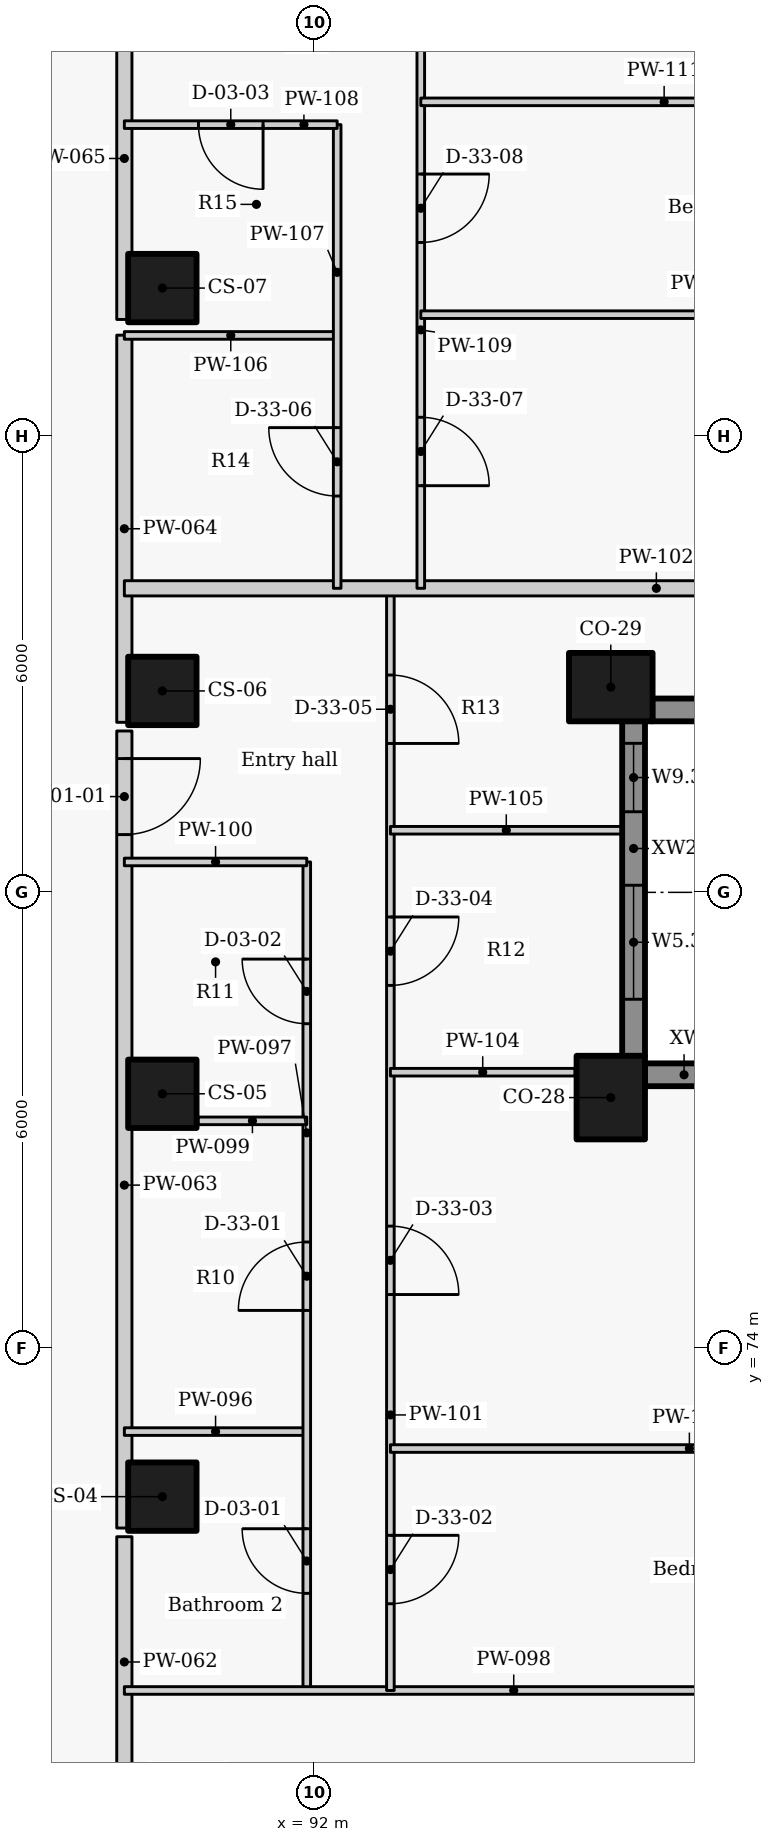
"""IFC4 building model, lengths in metres.
Left out: names, types, materials, properties, quantities, classifications, styles, units other than length and angle.
Written with IfcOpenShell. Run it as: python <this file> out.ifc"""

import sys

from ifc_helpers import new_model, si_unit, direction, frame, frame_2d, origin, origin_2d, place, context, subcontext, project, spatial, rectangle, extrude, element, fill, save


model = new_model("IFC4")
c1 = context("Model", 3, precision=1e-05, world=origin(), true_north=direction((0.0, 1.0)))
c2 = subcontext(c1, "Body", "Model", "MODEL_VIEW")
j1 = project(units=[si_unit("LENGTHUNIT", "METRE"), si_unit("PLANEANGLEUNIT", "RADIAN")], contexts=[c1])
p1 = place(None, origin())
s1 = spatial("IfcSite", under=j1, at=p1, CompositionType="ELEMENT")
p2 = place(p1, origin())
s2 = spatial("IfcBuilding", under=s1, at=p2, CompositionType="ELEMENT")
p3 = place(p2, frame((0.0, 0.0, 249.3)))
s3 = spatial("IfcBuildingStorey", under=s2, at=p3, CompositionType="ELEMENT", Elevation=249.3)
for number, where, z_axis, x_axis in (
    (1, (95.899, 77.3, 0.0), (0.0, 0.0, 1.0), (0.0, 1.0, 0.0)),
    (2, (95.899, 82.7, 0.0), (0.0, 0.0, 1.0), (1.0, 0.0, 0.0)),
):
    element("IfcColumn", number, at=place(p3, frame(where, z_axis=z_axis, x_axis=x_axis)), inside=s3, PredefinedType="COLUMN", context=c2, shape_type="SweptSolid", body=[
        extrude(rectangle(XDim=1.1, YDim=0.9, at=origin_2d()), origin(), (0.0, 0.0, 1.0), 3.3),
    ])
for number, where, z_axis, x_axis in (
    (3, (90.0, 72.05, 0.0), (0.0, 0.0, 1.0), (0.0, 1.0, 0.0)),
    (4, (90.0, 77.35, 0.0), (0.0, 0.0, 1.0), (0.0, 1.0, 0.0)),
    (5, (90.0, 82.65, 0.0), (0.0, 0.0, 1.0), (0.0, 1.0, 0.0)),
    (6, (90.0, 87.95, 0.0), (0.0, 0.0, 1.0), (0.0, 1.0, 0.0)),
):
    element("IfcColumn", number, at=place(p3, frame(where, z_axis=z_axis, x_axis=x_axis)), inside=s3, PredefinedType="COLUMN", context=c2, shape_type="SweptSolid", body=[
        extrude(rectangle(XDim=0.9, YDim=0.9, at=origin_2d()), origin(), (0.0, 0.0, 1.0), 3.3),
    ])
p4 = place(p3, frame((96.446, 82.4, 0.0), z_axis=(0.0, 0.0, 1.0), x_axis=(1.0, 0.0, 0.0)))
e7 = element("IfcWall", 7, at=p4, inside=s3, PredefinedType="SOLIDWALL", context=c2, shape_type="SweptSolid", body=[
    extrude(rectangle(XDim=4.272, YDim=0.3, at=frame_2d((2.136, 0.0))), origin(), (0.0, 0.0, 1.0), 2.425),
])
p5 = place(p4, frame((1.386, 0.0, 0.9)))
e8 = element("IfcOpeningElement", 8, at=p5, cuts=e7, PredefinedType="OPENING", context=c2, shape_type="SweptSolid", body=[
    extrude(rectangle(XDim=1.5, YDim=1.1, at=frame_2d((0.75, 0.55))), frame((0.0, 0.16, 0.0), z_axis=(0.0, -1.0, 0.0), x_axis=(1.0, 0.0, 0.0)), (0.0, 0.0, 1.0), 0.32),
])
p6 = place(p3, frame((100.718, 77.6, 0.0), z_axis=(0.0, 0.0, 1.0), x_axis=(-1.0, 0.0, 0.0)))
e9 = element("IfcWall", 9, at=p6, inside=s3, PredefinedType="SOLIDWALL", context=c2, shape_type="SweptSolid", body=[
    extrude(rectangle(XDim=4.373, YDim=0.3, at=frame_2d((2.186, 0.0))), origin(), (0.0, 0.0, 1.0), 2.425),
])
p7 = place(p6, frame((1.136, 0.0, 0.9)))
e10 = element("IfcOpeningElement", 10, at=p7, cuts=e9, PredefinedType="OPENING", context=c2, shape_type="SweptSolid", body=[
    extrude(rectangle(XDim=2.1, YDim=1.1, at=frame_2d((1.05, 0.55))), frame((0.0, 0.16, 0.0), z_axis=(0.0, -1.0, 0.0), x_axis=(1.0, 0.0, 0.0)), (0.0, 0.0, 1.0), 0.32),
])
p8 = place(p3, frame((96.199, 77.846, 0.0), z_axis=(0.0, 0.0, 1.0), x_axis=(0.0, 1.0, 0.0)))
e11 = element("IfcWall", 11, at=p8, inside=s3, PredefinedType="SOLIDWALL", context=c2, shape_type="SweptSolid", body=[
    extrude(rectangle(XDim=4.408, YDim=0.3, at=frame_2d((2.204, 0.0))), origin(), (0.0, 0.0, 1.0), 2.425),
])
p9 = place(p8, frame((0.748, 0.0, 0.9)))
e12 = element("IfcOpeningElement", 12, at=p9, cuts=e11, PredefinedType="OPENING", context=c2, shape_type="SweptSolid", body=[
    extrude(rectangle(XDim=1.5, YDim=1.1, at=frame_2d((0.75, 0.55))), frame((0.0, 0.16, 0.0), z_axis=(0.0, -1.0, 0.0), x_axis=(1.0, 0.0, 0.0)), (0.0, 0.0, 1.0), 0.32),
])
p10 = place(p8, frame((3.215, 0.0, 0.9)))
e13 = element("IfcOpeningElement", 13, at=p10, cuts=e11, PredefinedType="OPENING", context=c2, shape_type="SweptSolid", body=[
    extrude(rectangle(XDim=0.9, YDim=1.1, at=frame_2d((0.45, 0.55))), frame((0.0, 0.16, 0.0), z_axis=(0.0, -1.0, 0.0), x_axis=(1.0, 0.0, 0.0)), (0.0, 0.0, 1.0), 0.32),
])
p11 = place(p3, frame((89.5, 68.227, 0.0), z_axis=(0.0, 0.0, 1.0), x_axis=(0.0, 1.0, 0.0)))
e14 = element("IfcWall", 14, at=p11, inside=s3, PredefinedType="PARTITIONING", context=c2, shape_type="SweptSolid", body=[
    extrude(rectangle(XDim=3.296, YDim=0.2, at=frame_2d((1.648, 0.0))), origin(), (0.0, 0.0, 1.0), 3.025),
])
p12 = place(p3, frame((89.5, 82.123, 0.0), z_axis=(0.0, 0.0, 1.0), x_axis=(0.0, -1.0, 0.0)))
e15 = element("IfcWall", 15, at=p12, inside=s3, PredefinedType="PARTITIONING", context=c2, shape_type="SweptSolid", body=[
    extrude(rectangle(XDim=10.486, YDim=0.2, at=frame_2d((5.243, 0.0))), origin(), (0.0, 0.0, 1.0), 3.025),
])
p13 = place(p12, frame((0.363, 0.0, 0.0)))
e16 = element("IfcOpeningElement", 16, at=p13, cuts=e15, PredefinedType="OPENING", context=c2, shape_type="SweptSolid", body=[
    extrude(rectangle(XDim=1.0, YDim=2.1, at=frame_2d((0.5, 1.05))), frame((0.0, 0.11, 0.0), z_axis=(0.0, -1.0, 0.0), x_axis=(1.0, 0.0, 0.0)), (0.0, 0.0, 1.0), 0.22),
])
p14 = place(p3, frame((89.5, 82.237, 0.0), z_axis=(0.0, 0.0, 1.0), x_axis=(0.0, 1.0, 0.0)))
e17 = element("IfcWall", 17, at=p14, inside=s3, PredefinedType="PARTITIONING", context=c2, shape_type="SweptSolid", body=[
    extrude(rectangle(XDim=5.093, YDim=0.2, at=frame_2d((2.547, 0.0))), origin(), (0.0, 0.0, 1.0), 3.025),
])
p15 = place(p3, frame((89.5, 87.537, 0.0), z_axis=(0.0, 0.0, 1.0), x_axis=(0.0, 1.0, 0.0)))
e18 = element("IfcWall", 18, at=p15, inside=s3, PredefinedType="PARTITIONING", context=c2, shape_type="SweptSolid", body=[
    extrude(rectangle(XDim=4.236, YDim=0.2, at=frame_2d((2.118, 0.0))), origin(), (0.0, 0.0, 1.0), 3.025),
])
p16 = place(p3, frame((89.5, 72.906, 0.0), z_axis=(0.0, 0.0, 1.0), x_axis=(1.0, 0.0, 0.0)))
e19 = element("IfcWall", 19, at=p16, inside=s3, PredefinedType="PARTITIONING", context=c2, shape_type="SweptSolid", body=[
    extrude(rectangle(XDim=2.4, YDim=0.1, at=frame_2d((1.2, 0.0))), origin(), (0.0, 0.0, 1.0), 2.505),
])
p17 = place(p3, frame((91.9, 69.5, 0.0), z_axis=(0.0, 0.0, 1.0), x_axis=(0.0, 1.0, 0.0)))
e20 = element("IfcWall", 20, at=p17, inside=s3, PredefinedType="PARTITIONING", context=c2, shape_type="SweptSolid", body=[
    extrude(rectangle(XDim=10.9, YDim=0.1, at=frame_2d((5.45, 0.0))), origin(), (0.0, 0.0, 1.0), 3.025),
])
p18 = place(p17, frame((1.278, 0.0, 0.0)))
e21 = element("IfcOpeningElement", 21, at=p18, cuts=e20, PredefinedType="OPENING", context=c2, shape_type="SweptSolid", body=[
    extrude(rectangle(XDim=0.85, YDim=2.1, at=frame_2d((0.425, 1.05))), frame((0.0, 0.06, 0.0), z_axis=(0.0, -1.0, 0.0), x_axis=(1.0, 0.0, 0.0)), (0.0, 0.0, 1.0), 0.12),
])
p19 = place(p17, frame((5.0, 0.0, 0.0)))
e22 = element("IfcOpeningElement", 22, at=p19, cuts=e20, PredefinedType="OPENING", context=c2, shape_type="SweptSolid", body=[
    extrude(rectangle(XDim=0.9, YDim=2.1, at=frame_2d((0.45, 1.05))), frame((0.0, 0.06, 0.0), z_axis=(0.0, -1.0, 0.0), x_axis=(1.0, 0.0, 0.0)), (0.0, 0.0, 1.0), 0.12),
])
p20 = place(p17, frame((8.772, 0.0, 0.0)))
e23 = element("IfcOpeningElement", 23, at=p20, cuts=e20, PredefinedType="OPENING", context=c2, shape_type="SweptSolid", body=[
    extrude(rectangle(XDim=0.85, YDim=2.1, at=frame_2d((0.425, 1.05))), frame((0.0, 0.06, 0.0), z_axis=(0.0, -1.0, 0.0), x_axis=(1.0, 0.0, 0.0)), (0.0, 0.0, 1.0), 0.12),
])
p21 = place(p3, frame((89.5, 69.5, 0.0), z_axis=(0.0, 0.0, 1.0), x_axis=(1.0, 0.0, 0.0)))
e24 = element("IfcWall", 24, at=p21, inside=s3, PredefinedType="PARTITIONING", context=c2, shape_type="SweptSolid", body=[
    extrude(rectangle(XDim=10.245, YDim=0.1, at=frame_2d((5.123, 0.0))), origin(), (0.0, 0.0, 1.0), 2.405),
])
p22 = place(p3, frame((90.47, 76.994, 0.0), z_axis=(0.0, 0.0, 1.0), x_axis=(1.0, 0.0, 0.0)))
e25 = element("IfcWall", 25, at=p22, inside=s3, PredefinedType="PARTITIONING", context=c2, shape_type="SweptSolid", body=[
    extrude(rectangle(XDim=1.43, YDim=0.1, at=frame_2d((0.715, 0.0))), origin(), (0.0, 0.0, 1.0), 3.025),
])
p23 = place(p3, frame((89.5, 80.4, 0.0), z_axis=(0.0, 0.0, 1.0), x_axis=(1.0, 0.0, 0.0)))
e26 = element("IfcWall", 26, at=p23, inside=s3, PredefinedType="PARTITIONING", context=c2, shape_type="SweptSolid", body=[
    extrude(rectangle(XDim=2.4, YDim=0.1, at=frame_2d((1.2, 0.0))), origin(), (0.0, 0.0, 1.0), 2.505),
])
p24 = place(p3, frame((93.0, 84.0, 0.0), z_axis=(0.0, 0.0, 1.0), x_axis=(0.0, -1.0, 0.0)))
e27 = element("IfcWall", 27, at=p24, inside=s3, PredefinedType="PARTITIONING", context=c2, shape_type="SweptSolid", body=[
    extrude(rectangle(XDim=14.5, YDim=0.1, at=frame_2d((7.25, 0.0))), origin(), (0.0, 0.0, 1.0), 3.025),
])
p25 = place(p24, frame((12.459, 0.0, 0.0)))
e28 = element("IfcOpeningElement", 28, at=p25, cuts=e27, PredefinedType="OPENING", context=c2, shape_type="SweptSolid", body=[
    extrude(rectangle(XDim=0.9, YDim=2.1, at=frame_2d((0.45, 1.05))), frame((0.0, 0.06, 0.0), z_axis=(0.0, -1.0, 0.0), x_axis=(1.0, 0.0, 0.0)), (0.0, 0.0, 1.0), 0.12),
])
p26 = place(p24, frame((8.391, 0.0, 0.0)))
e29 = element("IfcOpeningElement", 29, at=p26, cuts=e27, PredefinedType="OPENING", context=c2, shape_type="SweptSolid", body=[
    extrude(rectangle(XDim=0.9, YDim=2.1, at=frame_2d((0.45, 1.05))), frame((0.0, 0.06, 0.0), z_axis=(0.0, -1.0, 0.0), x_axis=(1.0, 0.0, 0.0)), (0.0, 0.0, 1.0), 0.12),
])
p27 = place(p24, frame((4.324, 0.0, 0.0)))
e30 = element("IfcOpeningElement", 30, at=p27, cuts=e27, PredefinedType="OPENING", context=c2, shape_type="SweptSolid", body=[
    extrude(rectangle(XDim=0.9, YDim=2.1, at=frame_2d((0.45, 1.05))), frame((0.0, 0.06, 0.0), z_axis=(0.0, -1.0, 0.0), x_axis=(1.0, 0.0, 0.0)), (0.0, 0.0, 1.0), 0.12),
])
p28 = place(p24, frame((1.141, 0.0, 0.0)))
e31 = element("IfcOpeningElement", 31, at=p28, cuts=e27, PredefinedType="OPENING", context=c2, shape_type="SweptSolid", body=[
    extrude(rectangle(XDim=0.9, YDim=2.1, at=frame_2d((0.45, 1.05))), frame((0.0, 0.06, 0.0), z_axis=(0.0, -1.0, 0.0), x_axis=(1.0, 0.0, 0.0)), (0.0, 0.0, 1.0), 0.12),
])
p29 = place(p3, frame((89.5, 84.0, 0.0), z_axis=(0.0, 0.0, 1.0), x_axis=(1.0, 0.0, 0.0)))
e32 = element("IfcWall", 32, at=p29, inside=s3, PredefinedType="PARTITIONING", context=c2, shape_type="SweptSolid", body=[
    extrude(rectangle(XDim=13.998, YDim=0.2, at=frame_2d((6.999, 0.0))), origin(), (0.0, 0.0, 1.0), 2.405),
])
p30 = place(p3, frame((93.0, 72.683, 0.0), z_axis=(0.0, 0.0, 1.0), x_axis=(1.0, 0.0, 0.0)))
e33 = element("IfcWall", 33, at=p30, inside=s3, PredefinedType="PARTITIONING", context=c2, shape_type="SweptSolid", body=[
    extrude(rectangle(XDim=7.867, YDim=0.1, at=frame_2d((3.934, 0.0))), origin(), (0.0, 0.0, 1.0), 3.025),
])
p31 = place(p3, frame((93.0, 77.634, 0.0), z_axis=(0.0, 0.0, 1.0), x_axis=(1.0, 0.0, 0.0)))
e34 = element("IfcWall", 34, at=p31, inside=s3, PredefinedType="PARTITIONING", context=c2, shape_type="SweptSolid", body=[
    extrude(rectangle(XDim=2.429, YDim=0.1, at=frame_2d((1.215, 0.0))), origin(), (0.0, 0.0, 1.0), 3.025),
])
p32 = place(p3, frame((93.0, 80.817, 0.0), z_axis=(0.0, 0.0, 1.0), x_axis=(1.0, 0.0, 0.0)))
e35 = element("IfcWall", 35, at=p32, inside=s3, PredefinedType="PARTITIONING", context=c2, shape_type="SweptSolid", body=[
    extrude(rectangle(XDim=3.05, YDim=0.1, at=frame_2d((1.525, 0.0))), origin(), (0.0, 0.0, 1.0), 2.405),
])
p33 = place(p3, frame((89.5, 87.327, 0.0), z_axis=(0.0, 0.0, 1.0), x_axis=(1.0, 0.0, 0.0)))
e36 = element("IfcWall", 36, at=p33, inside=s3, PredefinedType="PARTITIONING", context=c2, shape_type="SweptSolid", body=[
    extrude(rectangle(XDim=2.8, YDim=0.1, at=frame_2d((1.4, 0.0))), origin(), (0.0, 0.0, 1.0), 2.505),
])
p34 = place(p3, frame((92.3, 84.0, 0.0), z_axis=(0.0, 0.0, 1.0), x_axis=(0.0, 1.0, 0.0)))
e37 = element("IfcWall", 37, at=p34, inside=s3, PredefinedType="PARTITIONING", context=c2, shape_type="SweptSolid", body=[
    extrude(rectangle(XDim=6.1, YDim=0.1, at=frame_2d((3.05, 0.0))), origin(), (0.0, 0.0, 1.0), 3.025),
])
p35 = place(p34, frame((1.214, 0.0, 0.0)))
e38 = element("IfcOpeningElement", 38, at=p35, cuts=e37, PredefinedType="OPENING", context=c2, shape_type="SweptSolid", body=[
    extrude(rectangle(XDim=0.9, YDim=2.1, at=frame_2d((0.45, 1.05))), frame((0.0, 0.06, 0.0), z_axis=(0.0, -1.0, 0.0), x_axis=(1.0, 0.0, 0.0)), (0.0, 0.0, 1.0), 0.12),
])
p36 = place(p3, frame((92.3, 90.1, 0.0), z_axis=(0.0, 0.0, 1.0), x_axis=(-1.0, 0.0, 0.0)))
e39 = element("IfcWall", 39, at=p36, inside=s3, PredefinedType="PARTITIONING", context=c2, shape_type="SweptSolid", body=[
    extrude(rectangle(XDim=2.8, YDim=0.1, at=frame_2d((1.4, 0.0))), origin(), (0.0, 0.0, 1.0), 2.505),
])
p37 = place(p36, frame((0.975, 0.0, 0.0)))
e40 = element("IfcOpeningElement", 40, at=p37, cuts=e39, PredefinedType="OPENING", context=c2, shape_type="SweptSolid", body=[
    extrude(rectangle(XDim=0.85, YDim=2.1, at=frame_2d((0.425, 1.05))), frame((0.0, 0.06, 0.0), z_axis=(0.0, -1.0, 0.0), x_axis=(1.0, 0.0, 0.0)), (0.0, 0.0, 1.0), 0.12),
])
p38 = place(p3, frame((93.4, 93.2, 0.0), z_axis=(0.0, 0.0, 1.0), x_axis=(0.0, -1.0, 0.0)))
e41 = element("IfcWall", 41, at=p38, inside=s3, PredefinedType="PARTITIONING", context=c2, shape_type="SweptSolid", body=[
    extrude(rectangle(XDim=9.2, YDim=0.1, at=frame_2d((4.6, 0.0))), origin(), (0.0, 0.0, 1.0), 3.025),
])
p39 = place(p38, frame((6.95, 0.0, 0.0)))
e42 = element("IfcOpeningElement", 42, at=p39, cuts=e41, PredefinedType="OPENING", context=c2, shape_type="SweptSolid", body=[
    extrude(rectangle(XDim=0.9, YDim=2.1, at=frame_2d((0.45, 1.05))), frame((0.0, 0.06, 0.0), z_axis=(0.0, -1.0, 0.0), x_axis=(1.0, 0.0, 0.0)), (0.0, 0.0, 1.0), 0.12),
])
p40 = place(p38, frame((3.75, 0.0, 0.0)))
e43 = element("IfcOpeningElement", 43, at=p40, cuts=e41, PredefinedType="OPENING", context=c2, shape_type="SweptSolid", body=[
    extrude(rectangle(XDim=0.9, YDim=2.1, at=frame_2d((0.45, 1.05))), frame((0.0, 0.06, 0.0), z_axis=(0.0, -1.0, 0.0), x_axis=(1.0, 0.0, 0.0)), (0.0, 0.0, 1.0), 0.12),
])
p41 = place(p38, frame((0.95, 0.0, 0.0)))
e44 = element("IfcOpeningElement", 44, at=p41, cuts=e41, PredefinedType="OPENING", context=c2, shape_type="SweptSolid", body=[
    extrude(rectangle(XDim=0.9, YDim=2.1, at=frame_2d((0.45, 1.05))), frame((0.0, 0.06, 0.0), z_axis=(0.0, -1.0, 0.0), x_axis=(1.0, 0.0, 0.0)), (0.0, 0.0, 1.0), 0.12),
])
p42 = place(p3, frame((93.4, 87.6, 0.0), z_axis=(0.0, 0.0, 1.0), x_axis=(1.0, 0.0, 0.0)))
e45 = element("IfcWall", 45, at=p42, inside=s3, PredefinedType="PARTITIONING", context=c2, shape_type="SweptSolid", body=[
    extrude(rectangle(XDim=7.556, YDim=0.1, at=frame_2d((3.778, 0.0))), origin(), (0.0, 0.0, 1.0), 3.025),
])
p43 = place(p3, frame((93.4, 90.4, 0.0), z_axis=(0.0, 0.0, 1.0), x_axis=(1.0, 0.0, 0.0)))
e46 = element("IfcWall", 46, at=p43, inside=s3, PredefinedType="PARTITIONING", context=c2, shape_type="SweptSolid", body=[
    extrude(rectangle(XDim=6.403, YDim=0.1, at=frame_2d((3.202, 0.0))), origin(), (0.0, 0.0, 1.0), 2.405),
])
p44 = place(p9, origin())
e47 = element("IfcWindow", 47, at=p44, inside=s3, PartitioningType="SINGLE_PANEL", PredefinedType="WINDOW", context=c2, shape_type="SweptSolid", body=[
    extrude(rectangle(XDim=1.5, YDim=1.1, at=frame_2d((0.75, 0.55))), frame((0.0, 0.03, 0.0), z_axis=(0.0, -1.0, 0.0), x_axis=(1.0, 0.0, 0.0)), (0.0, 0.0, 1.0), 0.06),
])
fill(e12, e47)
p45 = place(p10, origin())
e48 = element("IfcWindow", 48, at=p45, inside=s3, PartitioningType="SINGLE_PANEL", PredefinedType="WINDOW", context=c2, shape_type="SweptSolid", body=[
    extrude(rectangle(XDim=0.9, YDim=1.1, at=frame_2d((0.45, 0.55))), frame((0.0, 0.03, 0.0), z_axis=(0.0, -1.0, 0.0), x_axis=(1.0, 0.0, 0.0)), (0.0, 0.0, 1.0), 0.06),
])
fill(e13, e48)
p46 = place(p13, origin())
e49 = element("IfcDoor", 49, at=p46, inside=s3, OperationType="SINGLE_SWING_LEFT", PredefinedType="DOOR", context=c2, shape_type="SweptSolid", body=[
    extrude(rectangle(XDim=1.0, YDim=2.1, at=frame_2d((0.5, 1.05))), frame((0.0, 0.025, 0.0), z_axis=(0.0, -1.0, 0.0), x_axis=(1.0, 0.0, 0.0)), (0.0, 0.0, 1.0), 0.05),
])
fill(e16, e49)
p47 = place(p18, origin())
e50 = element("IfcDoor", 50, at=p47, inside=s3, OperationType="SINGLE_SWING_RIGHT", PredefinedType="DOOR", context=c2, shape_type="SweptSolid", body=[
    extrude(rectangle(XDim=0.85, YDim=2.1, at=frame_2d((0.425, 1.05))), frame((0.0, 0.025, 0.0), z_axis=(0.0, -1.0, 0.0), x_axis=(1.0, 0.0, 0.0)), (0.0, 0.0, 1.0), 0.05),
])
fill(e21, e50)
p48 = place(p19, origin())
e51 = element("IfcDoor", 51, at=p48, inside=s3, OperationType="SINGLE_SWING_LEFT", PredefinedType="DOOR", context=c2, shape_type="SweptSolid", body=[
    extrude(rectangle(XDim=0.9, YDim=2.1, at=frame_2d((0.45, 1.05))), frame((0.0, 0.025, 0.0), z_axis=(0.0, -1.0, 0.0), x_axis=(1.0, 0.0, 0.0)), (0.0, 0.0, 1.0), 0.05),
])
fill(e22, e51)
p49 = place(p20, origin())
e52 = element("IfcDoor", 52, at=p49, inside=s3, OperationType="SINGLE_SWING_RIGHT", PredefinedType="DOOR", context=c2, shape_type="SweptSolid", body=[
    extrude(rectangle(XDim=0.85, YDim=2.1, at=frame_2d((0.425, 1.05))), frame((0.0, 0.025, 0.0), z_axis=(0.0, -1.0, 0.0), x_axis=(1.0, 0.0, 0.0)), (0.0, 0.0, 1.0), 0.05),
])
fill(e23, e52)
p50 = place(p25, origin())
e53 = element("IfcDoor", 53, at=p50, inside=s3, OperationType="SINGLE_SWING_LEFT", PredefinedType="DOOR", context=c2, shape_type="SweptSolid", body=[
    extrude(rectangle(XDim=0.9, YDim=2.1, at=frame_2d((0.45, 1.05))), frame((0.0, 0.025, 0.0), z_axis=(0.0, -1.0, 0.0), x_axis=(1.0, 0.0, 0.0)), (0.0, 0.0, 1.0), 0.05),
])
fill(e28, e53)
p51 = place(p26, origin())
e54 = element("IfcDoor", 54, at=p51, inside=s3, OperationType="SINGLE_SWING_RIGHT", PredefinedType="DOOR", context=c2, shape_type="SweptSolid", body=[
    extrude(rectangle(XDim=0.9, YDim=2.1, at=frame_2d((0.45, 1.05))), frame((0.0, 0.025, 0.0), z_axis=(0.0, -1.0, 0.0), x_axis=(1.0, 0.0, 0.0)), (0.0, 0.0, 1.0), 0.05),
])
fill(e29, e54)
p52 = place(p27, origin())
e55 = element("IfcDoor", 55, at=p52, inside=s3, OperationType="SINGLE_SWING_LEFT", PredefinedType="DOOR", context=c2, shape_type="SweptSolid", body=[
    extrude(rectangle(XDim=0.9, YDim=2.1, at=frame_2d((0.45, 1.05))), frame((0.0, 0.025, 0.0), z_axis=(0.0, -1.0, 0.0), x_axis=(1.0, 0.0, 0.0)), (0.0, 0.0, 1.0), 0.05),
])
fill(e30, e55)
p53 = place(p28, origin())
e56 = element("IfcDoor", 56, at=p53, inside=s3, OperationType="SINGLE_SWING_RIGHT", PredefinedType="DOOR", context=c2, shape_type="SweptSolid", body=[
    extrude(rectangle(XDim=0.9, YDim=2.1, at=frame_2d((0.45, 1.05))), frame((0.0, 0.025, 0.0), z_axis=(0.0, -1.0, 0.0), x_axis=(1.0, 0.0, 0.0)), (0.0, 0.0, 1.0), 0.05),
])
fill(e31, e56)
p54 = place(p35, origin())
e57 = element("IfcDoor", 57, at=p54, inside=s3, OperationType="SINGLE_SWING_RIGHT", PredefinedType="DOOR", context=c2, shape_type="SweptSolid", body=[
    extrude(rectangle(XDim=0.9, YDim=2.1, at=frame_2d((0.45, 1.05))), frame((0.0, 0.025, 0.0), z_axis=(0.0, -1.0, 0.0), x_axis=(1.0, 0.0, 0.0)), (0.0, 0.0, 1.0), 0.05),
])
fill(e38, e57)
p55 = place(p37, origin())
e58 = element("IfcDoor", 58, at=p55, inside=s3, OperationType="SINGLE_SWING_LEFT", PredefinedType="DOOR", context=c2, shape_type="SweptSolid", body=[
    extrude(rectangle(XDim=0.85, YDim=2.1, at=frame_2d((0.425, 1.05))), frame((0.0, 0.025, 0.0), z_axis=(0.0, -1.0, 0.0), x_axis=(1.0, 0.0, 0.0)), (0.0, 0.0, 1.0), 0.05),
])
fill(e40, e58)
p56 = place(p39, origin())
e59 = element("IfcDoor", 59, at=p56, inside=s3, OperationType="SINGLE_SWING_RIGHT", PredefinedType="DOOR", context=c2, shape_type="SweptSolid", body=[
    extrude(rectangle(XDim=0.9, YDim=2.1, at=frame_2d((0.45, 1.05))), frame((0.0, 0.025, 0.0), z_axis=(0.0, -1.0, 0.0), x_axis=(1.0, 0.0, 0.0)), (0.0, 0.0, 1.0), 0.05),
])
fill(e42, e59)
p57 = place(p40, origin())
e60 = element("IfcDoor", 60, at=p57, inside=s3, OperationType="SINGLE_SWING_LEFT", PredefinedType="DOOR", context=c2, shape_type="SweptSolid", body=[
    extrude(rectangle(XDim=0.9, YDim=2.1, at=frame_2d((0.45, 1.05))), frame((0.0, 0.025, 0.0), z_axis=(0.0, -1.0, 0.0), x_axis=(1.0, 0.0, 0.0)), (0.0, 0.0, 1.0), 0.05),
])
fill(e43, e60)
save(model, sys.argv[1])
